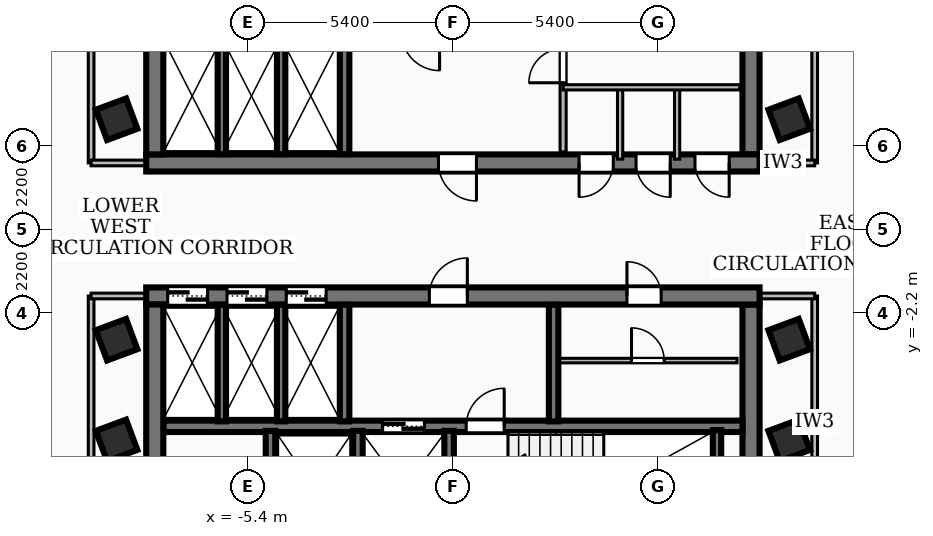
"""IFC4 building model, lengths in metres.
Left out: names, types, materials, properties, quantities, classifications, styles, units other than length and angle.
Written with IfcOpenShell. Run it as: python <this file> out.ifc"""

import sys

from ifc_helpers import new_model, si_unit, direction, frame, frame_2d, origin, origin_2d, place, context, subcontext, project, spatial, rectangle, extrude, element, fill, save


model = new_model("IFC4")
c1 = context("Model", 3, precision=1e-05, world=origin(), true_north=direction((0.0, 1.0)))
c2 = subcontext(c1, "Body", "Model", "MODEL_VIEW")
j1 = project(units=[si_unit("LENGTHUNIT", "METRE"), si_unit("PLANEANGLEUNIT", "RADIAN")], contexts=[c1])
p1 = place(None, origin())
s1 = spatial("IfcSite", under=j1, at=p1, CompositionType="ELEMENT")
p2 = place(p1, origin())
s2 = spatial("IfcBuilding", under=s1, at=p2, CompositionType="ELEMENT")
p3 = place(p2, frame((0.0, 0.0, 166.68)))
s3 = spatial("IfcBuildingStorey", under=s2, at=p3, CompositionType="ELEMENT", Elevation=166.68)
p4 = place(p3, frame((8.07, 1.75, 0.0), z_axis=(0.0, 0.0, 1.0), x_axis=(-1.0, 0.0, 0.0)))
e1 = element("IfcWall", 1, at=p4, inside=s3, PredefinedType="SHEAR", context=c2, shape_type="SweptSolid", body=[
    extrude(rectangle(XDim=16.14, YDim=0.45, at=frame_2d((8.07, 0.0))), origin(), (0.0, 0.0, 1.0), 3.34),
])
p5 = place(p4, frame((7.45, 0.0, 0.0)))
e2 = element("IfcOpeningElement", 2, at=p5, cuts=e1, PredefinedType="OPENING", context=c2, shape_type="SweptSolid", body=[
    extrude(rectangle(XDim=1.0, YDim=2.1, at=frame_2d((0.5, 1.05))), frame((0.0, 0.235, 0.0), z_axis=(0.0, -1.0, 0.0), x_axis=(1.0, 0.0, 0.0)), (0.0, 0.0, 1.0), 0.47),
])
p6 = place(p4, frame((3.85, 0.0, 0.0)))
e3 = element("IfcOpeningElement", 3, at=p6, cuts=e1, PredefinedType="OPENING", context=c2, shape_type="SweptSolid", body=[
    extrude(rectangle(XDim=0.9, YDim=2.06, at=frame_2d((0.45, 1.03))), frame((0.0, 0.235, 0.0), z_axis=(0.0, -1.0, 0.0), x_axis=(1.0, 0.0, 0.0)), (0.0, 0.0, 1.0), 0.47),
])
p7 = place(p4, frame((2.35, 0.0, 0.0)))
e4 = element("IfcOpeningElement", 4, at=p7, cuts=e1, PredefinedType="OPENING", context=c2, shape_type="SweptSolid", body=[
    extrude(rectangle(XDim=0.9, YDim=2.06, at=frame_2d((0.45, 1.03))), frame((0.0, 0.235, 0.0), z_axis=(0.0, -1.0, 0.0), x_axis=(1.0, 0.0, 0.0)), (0.0, 0.0, 1.0), 0.47),
])
p8 = place(p4, frame((0.8, 0.0, 0.0)))
e5 = element("IfcOpeningElement", 5, at=p8, cuts=e1, PredefinedType="OPENING", context=c2, shape_type="SweptSolid", body=[
    extrude(rectangle(XDim=0.9, YDim=2.06, at=frame_2d((0.45, 1.03))), frame((0.0, 0.235, 0.0), z_axis=(0.0, -1.0, 0.0), x_axis=(1.0, 0.0, 0.0)), (0.0, 0.0, 1.0), 0.47),
])
for number, where, z_axis, x_axis in (
    (6, (-7.845, 1.975, 0.0), (0.0, 0.0, 1.0), (0.0, 1.0, 0.0)),
    (7, (7.845, 8.31, 0.0), (0.0, 0.0, 1.0), (0.0, -1.0, 0.0)),
):
    element("IfcWall", number, at=place(p3, frame(where, z_axis=z_axis, x_axis=x_axis)), inside=s3, PredefinedType="SHEAR", context=c2, shape_type="SweptSolid", body=[
        extrude(rectangle(XDim=6.335, YDim=0.45, at=frame_2d((3.167, 0.0))), origin(), (0.0, 0.0, 1.0), 3.34),
    ])
p9 = place(p3, frame((-8.07, -1.75, 0.0), z_axis=(0.0, 0.0, 1.0), x_axis=(1.0, 0.0, 0.0)))
e8 = element("IfcWall", 8, at=p9, inside=s3, PredefinedType="SHEAR", context=c2, shape_type="SweptSolid", body=[
    extrude(rectangle(XDim=16.14, YDim=0.45, at=frame_2d((8.07, 0.0))), origin(), (0.0, 0.0, 1.0), 3.34),
])
p10 = place(p9, frame((7.45, 0.0, 0.0)))
e9 = element("IfcOpeningElement", 9, at=p10, cuts=e8, PredefinedType="OPENING", context=c2, shape_type="SweptSolid", body=[
    extrude(rectangle(XDim=1.0, YDim=2.1, at=frame_2d((0.5, 1.05))), frame((0.0, 0.235, 0.0), z_axis=(0.0, -1.0, 0.0), x_axis=(1.0, 0.0, 0.0)), (0.0, 0.0, 1.0), 0.47),
])
p11 = place(p9, frame((12.65, 0.0, 0.0)))
e10 = element("IfcOpeningElement", 10, at=p11, cuts=e8, PredefinedType="OPENING", context=c2, shape_type="SweptSolid", body=[
    extrude(rectangle(XDim=0.9, YDim=2.06, at=frame_2d((0.45, 1.03))), frame((0.0, 0.235, 0.0), z_axis=(0.0, -1.0, 0.0), x_axis=(1.0, 0.0, 0.0)), (0.0, 0.0, 1.0), 0.47),
])
p12 = place(p9, frame((0.565, 0.0, 0.0)))
e11 = element("IfcOpeningElement", 11, at=p12, cuts=e8, PredefinedType="OPENING", context=c2, shape_type="SweptSolid", body=[
    extrude(rectangle(XDim=1.05, YDim=2.15, at=frame_2d((0.525, 1.075))), frame((0.0, 0.235, 0.0), z_axis=(0.0, -1.0, 0.0), x_axis=(1.0, 0.0, 0.0)), (0.0, 0.0, 1.0), 0.47),
])
p13 = place(p9, frame((2.125, 0.0, 0.0)))
e12 = element("IfcOpeningElement", 12, at=p13, cuts=e8, PredefinedType="OPENING", context=c2, shape_type="SweptSolid", body=[
    extrude(rectangle(XDim=1.05, YDim=2.15, at=frame_2d((0.525, 1.075))), frame((0.0, 0.235, 0.0), z_axis=(0.0, -1.0, 0.0), x_axis=(1.0, 0.0, 0.0)), (0.0, 0.0, 1.0), 0.47),
])
p14 = place(p9, frame((3.685, 0.0, 0.0)))
e13 = element("IfcOpeningElement", 13, at=p14, cuts=e8, PredefinedType="OPENING", context=c2, shape_type="SweptSolid", body=[
    extrude(rectangle(XDim=1.05, YDim=2.15, at=frame_2d((0.525, 1.075))), frame((0.0, 0.235, 0.0), z_axis=(0.0, -1.0, 0.0), x_axis=(1.0, 0.0, 0.0)), (0.0, 0.0, 1.0), 0.47),
])
for number, where, z_axis, x_axis in (
    (14, (-7.845, -8.31, 0.0), (0.0, 0.0, 1.0), (0.0, 1.0, 0.0)),
    (15, (7.845, -1.975, 0.0), (0.0, 0.0, 1.0), (0.0, -1.0, 0.0)),
):
    element("IfcWall", number, at=place(p3, frame(where, z_axis=z_axis, x_axis=x_axis)), inside=s3, PredefinedType="SHEAR", context=c2, shape_type="SweptSolid", body=[
        extrude(rectangle(XDim=6.335, YDim=0.45, at=frame_2d((3.167, 0.0))), origin(), (0.0, 0.0, 1.0), 3.34),
    ])
p15 = place(p3, frame((-7.62, -5.18, 0.0), z_axis=(0.0, 0.0, 1.0), x_axis=(1.0, 0.0, 0.0)))
e16 = element("IfcWall", 16, at=p15, inside=s3, PredefinedType="SOLIDWALL", context=c2, shape_type="SweptSolid", body=[
    extrude(rectangle(XDim=15.24, YDim=0.3, at=frame_2d((7.62, 0.0))), origin(), (0.0, 0.0, 1.0), 3.34),
])
p16 = place(p15, frame((5.77, 0.0, 0.0)))
e17 = element("IfcOpeningElement", 17, at=p16, cuts=e16, PredefinedType="OPENING", context=c2, shape_type="SweptSolid", body=[
    extrude(rectangle(XDim=1.1, YDim=2.15, at=frame_2d((0.55, 1.075))), frame((0.0, 0.16, 0.0), z_axis=(0.0, -1.0, 0.0), x_axis=(1.0, 0.0, 0.0)), (0.0, 0.0, 1.0), 0.32),
])
p17 = place(p15, frame((7.97, 0.0, 0.0)))
e18 = element("IfcOpeningElement", 18, at=p17, cuts=e16, PredefinedType="OPENING", context=c2, shape_type="SweptSolid", body=[
    extrude(rectangle(XDim=1.0, YDim=2.1, at=frame_2d((0.5, 1.05))), frame((0.0, 0.16, 0.0), z_axis=(0.0, -1.0, 0.0), x_axis=(1.0, 0.0, 0.0)), (0.0, 0.0, 1.0), 0.32),
])
p18 = place(p3, frame((6.95, -8.34, 0.0), z_axis=(0.0, 0.0, 1.0), x_axis=(0.0, 1.0, 0.0)))
e19 = element("IfcWall", 19, at=p18, inside=s3, PredefinedType="SOLIDWALL", context=c2, shape_type="SweptSolid", body=[
    extrude(rectangle(XDim=3.06, YDim=0.22, at=frame_2d((1.53, 0.0))), origin(), (0.0, 0.0, 1.0), 3.34),
])
p19 = place(p3, frame((-2.85, 1.98, 0.0), z_axis=(0.0, 0.0, 1.0), x_axis=(0.0, 1.0, 0.0)))
e20 = element("IfcWall", 20, at=p19, inside=s3, PredefinedType="SOLIDWALL", context=c2, shape_type="SweptSolid", body=[
    extrude(rectangle(XDim=3.07, YDim=0.25, at=frame_2d((1.535, 0.0))), origin(), (0.0, 0.0, 1.0), 3.34),
])
for number, where, z_axis, x_axis in (
    (21, (-0.1, -8.34, 0.0), (0.0, 0.0, 1.0), (0.0, 1.0, 0.0)),
    (22, (-2.5, -8.34, 0.0), (0.0, 0.0, 1.0), (0.0, 1.0, 0.0)),
    (23, (-4.8, -8.34, 0.0), (0.0, 0.0, 1.0), (0.0, 1.0, 0.0)),
):
    element("IfcWall", number, at=place(p3, frame(where, z_axis=z_axis, x_axis=x_axis)), inside=s3, PredefinedType="SOLIDWALL", context=c2, shape_type="SweptSolid", body=[
        extrude(rectangle(XDim=3.04, YDim=0.25, at=frame_2d((1.52, 0.0))), origin(), (0.0, 0.0, 1.0), 3.34),
    ])
for number, where, z_axis, x_axis in (
    (24, (-2.85, -5.05, 0.0), (0.0, 0.0, 1.0), (0.0, 1.0, 0.0)),
    (25, (2.65, -5.05, 0.0), (0.0, 0.0, 1.0), (0.0, 1.0, 0.0)),
):
    element("IfcWall", number, at=place(p3, frame(where, z_axis=z_axis, x_axis=x_axis)), inside=s3, PredefinedType="SOLIDWALL", context=c2, shape_type="SweptSolid", body=[
        extrude(rectangle(XDim=3.07, YDim=0.25, at=frame_2d((1.535, 0.0))), origin(), (0.0, 0.0, 1.0), 3.34),
    ])
for number, where, z_axis, x_axis in (
    (26, (-6.08, 1.98, 0.0), (0.0, 0.0, 1.0), (0.0, 1.0, 0.0)),
    (27, (-4.52, 1.98, 0.0), (0.0, 0.0, 1.0), (0.0, 1.0, 0.0)),
    (28, (-6.08, -5.05, 0.0), (0.0, 0.0, 1.0), (0.0, 1.0, 0.0)),
    (29, (-4.52, -5.05, 0.0), (0.0, 0.0, 1.0), (0.0, 1.0, 0.0)),
):
    element("IfcWall", number, at=place(p3, frame(where, z_axis=z_axis, x_axis=x_axis)), inside=s3, PredefinedType="SOLIDWALL", context=c2, shape_type="SweptSolid", body=[
        extrude(rectangle(XDim=3.07, YDim=0.22, at=frame_2d((1.535, 0.0))), origin(), (0.0, 0.0, 1.0), 3.34),
    ])
for number, where, z_axis, x_axis in (
    (30, (-8.85, -5.55, 0.0), (0.0, 0.0, 1.0), (0.937, 0.349, 0.0)),
    (31, (-8.85, -2.9, 0.0), (0.0, 0.0, 1.0), (0.937, 0.349, 0.0)),
    (32, (-8.85, 2.9, 0.0), (0.0, 0.0, 1.0), (0.937, 0.349, 0.0)),
    (33, (8.85, -5.55, 0.0), (0.0, 0.0, 1.0), (0.937, 0.349, 0.0)),
    (34, (8.85, -2.9, 0.0), (0.0, 0.0, 1.0), (0.937, 0.349, 0.0)),
    (35, (8.85, 2.9, 0.0), (0.0, 0.0, 1.0), (0.937, 0.349, 0.0)),
):
    element("IfcColumn", number, at=place(p3, frame(where, z_axis=z_axis, x_axis=x_axis)), inside=s3, PredefinedType="COLUMN", context=c2, shape_type="SweptSolid", body=[
        extrude(rectangle(XDim=0.85, YDim=0.85, at=origin_2d()), origin(), (0.0, 0.0, 1.0), 3.6),
    ])
p20 = place(p3, frame((2.9, 2.04, 0.0), z_axis=(0.0, 0.0, 1.0), x_axis=(0.0, 1.0, 0.0)))
e36 = element("IfcWall", 36, at=p20, inside=s3, PredefinedType="PARTITIONING", context=c2, shape_type="SweptSolid", body=[
    extrude(rectangle(XDim=2.94, YDim=0.16, at=frame_2d((1.47, 0.0))), origin(), (0.0, 0.0, 1.0), 2.57),
])
p21 = place(p20, frame((1.82, 0.0, 0.0)))
e37 = element("IfcOpeningElement", 37, at=p21, cuts=e36, PredefinedType="OPENING", context=c2, shape_type="SweptSolid", body=[
    extrude(rectangle(XDim=0.9, YDim=2.06, at=frame_2d((0.45, 1.03))), frame((0.0, 0.09, 0.0), z_axis=(0.0, -1.0, 0.0), x_axis=(1.0, 0.0, 0.0)), (0.0, 0.0, 1.0), 0.18),
])
p22 = place(p3, frame((2.9, 3.74, 0.0), z_axis=(0.0, 0.0, 1.0), x_axis=(1.0, 0.0, 0.0)))
e38 = element("IfcWall", 38, at=p22, inside=s3, PredefinedType="PARTITIONING", context=c2, shape_type="SweptSolid", body=[
    extrude(rectangle(XDim=4.65, YDim=0.138, at=frame_2d((2.325, 0.0))), origin(), (0.0, 0.0, 1.0), 3.34),
])
p23 = place(p3, frame((2.8, -3.45, 0.0), z_axis=(0.0, 0.0, 1.0), x_axis=(1.0, 0.0, 0.0)))
e39 = element("IfcWall", 39, at=p23, inside=s3, PredefinedType="PARTITIONING", context=c2, shape_type="SweptSolid", body=[
    extrude(rectangle(XDim=4.68, YDim=0.12, at=frame_2d((2.34, 0.0))), origin(), (0.0, 0.0, 1.0), 3.34),
])
p24 = place(p23, frame((1.9, 0.0, 0.0)))
e40 = element("IfcOpeningElement", 40, at=p24, cuts=e39, PredefinedType="OPENING", context=c2, shape_type="SweptSolid", body=[
    extrude(rectangle(XDim=0.86, YDim=2.04, at=frame_2d((0.43, 1.02))), frame((0.0, 0.07, 0.0), z_axis=(0.0, -1.0, 0.0), x_axis=(1.0, 0.0, 0.0)), (0.0, 0.0, 1.0), 0.14),
])
for number, where, z_axis, x_axis in (
    (41, (4.4, 1.85, 0.0), (0.0, 0.0, 1.0), (0.0, 1.0, 0.0)),
    (42, (5.9, 1.85, 0.0), (0.0, 0.0, 1.0), (0.0, 1.0, 0.0)),
):
    element("IfcWall", number, at=place(p3, frame(where, z_axis=z_axis, x_axis=x_axis)), inside=s3, PredefinedType="PARTITIONING", context=c2, shape_type="SweptSolid", body=[
        extrude(rectangle(XDim=1.89, YDim=0.138, at=frame_2d((0.945, 0.0))), origin(), (0.0, 0.0, 1.0), 2.57),
    ])
p25 = place(p3, frame((-9.52, 1.75, 0.0), z_axis=(0.0, 0.0, 1.0), x_axis=(0.0, 1.0, 0.0)))
e43 = element("IfcWall", 43, at=p25, inside=s3, PredefinedType="PARTITIONING", context=c2, shape_type="SweptSolid", body=[
    extrude(rectangle(XDim=6.63, YDim=0.15, at=frame_2d((3.315, 0.0))), origin(), (0.0, 0.0, 1.0), 3.34),
])
p26 = place(p3, frame((-7.85, 1.75, 0.0), z_axis=(0.0, 0.0, 1.0), x_axis=(-1.0, 0.0, 0.0)))
e44 = element("IfcWall", 44, at=p26, inside=s3, PredefinedType="PARTITIONING", context=c2, shape_type="SweptSolid", body=[
    extrude(rectangle(XDim=1.67, YDim=0.15, at=frame_2d((0.835, 0.0))), origin(), (0.0, 0.0, 1.0), 2.57),
])
p27 = place(p3, frame((-9.52, -8.38, 0.0), z_axis=(0.0, 0.0, 1.0), x_axis=(0.0, 1.0, 0.0)))
e45 = element("IfcWall", 45, at=p27, inside=s3, PredefinedType="PARTITIONING", context=c2, shape_type="SweptSolid", body=[
    extrude(rectangle(XDim=6.63, YDim=0.15, at=frame_2d((3.315, 0.0))), origin(), (0.0, 0.0, 1.0), 2.644),
])
p28 = place(p3, frame((-7.85, -1.75, 0.0), z_axis=(0.0, 0.0, 1.0), x_axis=(-1.0, 0.0, 0.0)))
e46 = element("IfcWall", 46, at=p28, inside=s3, PredefinedType="PARTITIONING", context=c2, shape_type="SweptSolid", body=[
    extrude(rectangle(XDim=1.67, YDim=0.15, at=frame_2d((0.835, 0.0))), origin(), (0.0, 0.0, 1.0), 2.57),
])
p29 = place(p3, frame((9.52, 1.75, 0.0), z_axis=(0.0, 0.0, 1.0), x_axis=(0.0, 1.0, 0.0)))
e47 = element("IfcWall", 47, at=p29, inside=s3, PredefinedType="PARTITIONING", context=c2, shape_type="SweptSolid", body=[
    extrude(rectangle(XDim=6.63, YDim=0.15, at=frame_2d((3.315, 0.0))), origin(), (0.0, 0.0, 1.0), 2.644),
])
p30 = place(p3, frame((7.85, 1.75, 0.0), z_axis=(0.0, 0.0, 1.0), x_axis=(1.0, 0.0, 0.0)))
e48 = element("IfcWall", 48, at=p30, inside=s3, PredefinedType="PARTITIONING", context=c2, shape_type="SweptSolid", body=[
    extrude(rectangle(XDim=1.67, YDim=0.15, at=frame_2d((0.835, 0.0))), origin(), (0.0, 0.0, 1.0), 2.57),
])
p31 = place(p3, frame((9.52, -8.38, 0.0), z_axis=(0.0, 0.0, 1.0), x_axis=(0.0, 1.0, 0.0)))
e49 = element("IfcWall", 49, at=p31, inside=s3, PredefinedType="PARTITIONING", context=c2, shape_type="SweptSolid", body=[
    extrude(rectangle(XDim=6.63, YDim=0.15, at=frame_2d((3.315, 0.0))), origin(), (0.0, 0.0, 1.0), 3.34),
])
p32 = place(p3, frame((7.85, -1.75, 0.0), z_axis=(0.0, 0.0, 1.0), x_axis=(1.0, 0.0, 0.0)))
e50 = element("IfcWall", 50, at=p32, inside=s3, PredefinedType="PARTITIONING", context=c2, shape_type="SweptSolid", body=[
    extrude(rectangle(XDim=1.67, YDim=0.15, at=frame_2d((0.835, 0.0))), origin(), (0.0, 0.0, 1.0), 2.57),
])
p33 = place(p3, frame((9.846, 14.522, 0.0), z_axis=(0.0, 0.0, 1.0), x_axis=(0.348543090668, -0.937292757866, 0.0)))
e51 = element("IfcWall", 51, at=p33, inside=s3, PredefinedType="PARTITIONING", context=c2, shape_type="SweptSolid", body=[
    extrude(rectangle(XDim=20.198, YDim=0.1, at=frame_2d((10.099, 0.0))), origin(), (0.0, 0.0, 1.0), 2.644),
])
p34 = place(p33, frame((9.579, 0.0, 0.0)))
e52 = element("IfcOpeningElement", 52, at=p34, cuts=e51, PredefinedType="OPENING", context=c2, shape_type="SweptSolid", body=[
    extrude(rectangle(XDim=1.2, YDim=2.1, at=frame_2d((0.6, 1.05))), frame((0.0, 0.06, 0.0), z_axis=(0.0, -1.0, 0.0), x_axis=(1.0, 0.0, 0.0)), (0.0, 0.0, 1.0), 0.12),
])
p35 = place(p3, frame((-9.846, -14.522, 0.0), z_axis=(0.0, 0.0, 1.0), x_axis=(-0.348543090668, 0.937292757866, 0.0)))
e53 = element("IfcWall", 53, at=p35, inside=s3, PredefinedType="PARTITIONING", context=c2, shape_type="SweptSolid", body=[
    extrude(rectangle(XDim=20.198, YDim=0.1, at=frame_2d((10.099, 0.0))), origin(), (0.0, 0.0, 1.0), 2.644),
])
p36 = place(p35, frame((9.579, 0.0, 0.0)))
e54 = element("IfcOpeningElement", 54, at=p36, cuts=e53, PredefinedType="OPENING", context=c2, shape_type="SweptSolid", body=[
    extrude(rectangle(XDim=1.2, YDim=2.1, at=frame_2d((0.6, 1.05))), frame((0.0, 0.06, 0.0), z_axis=(0.0, -1.0, 0.0), x_axis=(1.0, 0.0, 0.0)), (0.0, 0.0, 1.0), 0.12),
])
p37 = place(p5, origin())
e55 = element("IfcDoor", 55, at=p37, inside=s3, OperationType="SINGLE_SWING_LEFT", PredefinedType="DOOR", context=c2, shape_type="SweptSolid", body=[
    extrude(rectangle(XDim=1.0, YDim=2.1, at=frame_2d((0.5, 1.05))), frame((0.0, 0.025, 0.0), z_axis=(0.0, -1.0, 0.0), x_axis=(1.0, 0.0, 0.0)), (0.0, 0.0, 1.0), 0.05),
])
fill(e2, e55)
p38 = place(p10, origin())
e56 = element("IfcDoor", 56, at=p38, inside=s3, OperationType="SINGLE_SWING_RIGHT", PredefinedType="DOOR", context=c2, shape_type="SweptSolid", body=[
    extrude(rectangle(XDim=1.0, YDim=2.1, at=frame_2d((0.5, 1.05))), frame((0.0, 0.025, 0.0), z_axis=(0.0, -1.0, 0.0), x_axis=(1.0, 0.0, 0.0)), (0.0, 0.0, 1.0), 0.05),
])
fill(e9, e56)
p39 = place(p16, origin())
e57 = element("IfcDoor", 57, at=p39, inside=s3, OperationType="DOUBLE_DOOR_SLIDING", PredefinedType="DOOR", context=c2, shape_type="SweptSolid", body=[
    extrude(rectangle(XDim=1.1, YDim=2.15, at=frame_2d((0.55, 1.075))), frame((0.0, 0.025, 0.0), z_axis=(0.0, -1.0, 0.0), x_axis=(1.0, 0.0, 0.0)), (0.0, 0.0, 1.0), 0.05),
])
fill(e17, e57)
p40 = place(p17, origin())
e58 = element("IfcDoor", 58, at=p40, inside=s3, OperationType="SINGLE_SWING_RIGHT", PredefinedType="DOOR", context=c2, shape_type="SweptSolid", body=[
    extrude(rectangle(XDim=1.0, YDim=2.1, at=frame_2d((0.5, 1.05))), frame((0.0, 0.025, 0.0), z_axis=(0.0, -1.0, 0.0), x_axis=(1.0, 0.0, 0.0)), (0.0, 0.0, 1.0), 0.05),
])
fill(e18, e58)
p41 = place(p11, origin())
e59 = element("IfcDoor", 59, at=p41, inside=s3, OperationType="SINGLE_SWING_LEFT", PredefinedType="DOOR", context=c2, shape_type="SweptSolid", body=[
    extrude(rectangle(XDim=0.9, YDim=2.06, at=frame_2d((0.45, 1.03))), frame((0.0, 0.025, 0.0), z_axis=(0.0, -1.0, 0.0), x_axis=(1.0, 0.0, 0.0)), (0.0, 0.0, 1.0), 0.05),
])
fill(e10, e59)
p42 = place(p12, origin())
e60 = element("IfcDoor", 60, at=p42, inside=s3, OperationType="DOUBLE_DOOR_SLIDING", PredefinedType="DOOR", context=c2, shape_type="SweptSolid", body=[
    extrude(rectangle(XDim=1.05, YDim=2.15, at=frame_2d((0.525, 1.075))), frame((0.0, 0.025, 0.0), z_axis=(0.0, -1.0, 0.0), x_axis=(1.0, 0.0, 0.0)), (0.0, 0.0, 1.0), 0.05),
])
fill(e11, e60)
p43 = place(p13, origin())
e61 = element("IfcDoor", 61, at=p43, inside=s3, OperationType="DOUBLE_DOOR_SLIDING", PredefinedType="DOOR", context=c2, shape_type="SweptSolid", body=[
    extrude(rectangle(XDim=1.05, YDim=2.15, at=frame_2d((0.525, 1.075))), frame((0.0, 0.025, 0.0), z_axis=(0.0, -1.0, 0.0), x_axis=(1.0, 0.0, 0.0)), (0.0, 0.0, 1.0), 0.05),
])
fill(e12, e61)
p44 = place(p14, origin())
e62 = element("IfcDoor", 62, at=p44, inside=s3, OperationType="DOUBLE_DOOR_SLIDING", PredefinedType="DOOR", context=c2, shape_type="SweptSolid", body=[
    extrude(rectangle(XDim=1.05, YDim=2.15, at=frame_2d((0.525, 1.075))), frame((0.0, 0.025, 0.0), z_axis=(0.0, -1.0, 0.0), x_axis=(1.0, 0.0, 0.0)), (0.0, 0.0, 1.0), 0.05),
])
fill(e13, e62)
p45 = place(p6, origin())
e63 = element("IfcDoor", 63, at=p45, inside=s3, OperationType="SINGLE_SWING_RIGHT", PredefinedType="DOOR", context=c2, shape_type="SweptSolid", body=[
    extrude(rectangle(XDim=0.9, YDim=2.06, at=frame_2d((0.45, 1.03))), frame((0.0, 0.025, 0.0), z_axis=(0.0, -1.0, 0.0), x_axis=(1.0, 0.0, 0.0)), (0.0, 0.0, 1.0), 0.05),
])
fill(e3, e63)
p46 = place(p7, origin())
e64 = element("IfcDoor", 64, at=p46, inside=s3, OperationType="SINGLE_SWING_LEFT", PredefinedType="DOOR", context=c2, shape_type="SweptSolid", body=[
    extrude(rectangle(XDim=0.9, YDim=2.06, at=frame_2d((0.45, 1.03))), frame((0.0, 0.025, 0.0), z_axis=(0.0, -1.0, 0.0), x_axis=(1.0, 0.0, 0.0)), (0.0, 0.0, 1.0), 0.05),
])
fill(e4, e64)
p47 = place(p8, origin())
e65 = element("IfcDoor", 65, at=p47, inside=s3, OperationType="SINGLE_SWING_LEFT", PredefinedType="DOOR", context=c2, shape_type="SweptSolid", body=[
    extrude(rectangle(XDim=0.9, YDim=2.06, at=frame_2d((0.45, 1.03))), frame((0.0, 0.025, 0.0), z_axis=(0.0, -1.0, 0.0), x_axis=(1.0, 0.0, 0.0)), (0.0, 0.0, 1.0), 0.05),
])
fill(e5, e65)
p48 = place(p21, origin())
e66 = element("IfcDoor", 66, at=p48, inside=s3, OperationType="SINGLE_SWING_LEFT", PredefinedType="DOOR", context=c2, shape_type="SweptSolid", body=[
    extrude(rectangle(XDim=0.9, YDim=2.06, at=frame_2d((0.45, 1.03))), frame((0.0, 0.025, 0.0), z_axis=(0.0, -1.0, 0.0), x_axis=(1.0, 0.0, 0.0)), (0.0, 0.0, 1.0), 0.05),
])
fill(e37, e66)
p49 = place(p24, origin())
e67 = element("IfcDoor", 67, at=p49, inside=s3, OperationType="SINGLE_SWING_LEFT", PredefinedType="DOOR", context=c2, shape_type="SweptSolid", body=[
    extrude(rectangle(XDim=0.86, YDim=2.04, at=frame_2d((0.43, 1.02))), frame((0.0, 0.025, 0.0), z_axis=(0.0, -1.0, 0.0), x_axis=(1.0, 0.0, 0.0)), (0.0, 0.0, 1.0), 0.05),
])
fill(e40, e67)
save(model, sys.argv[1])
